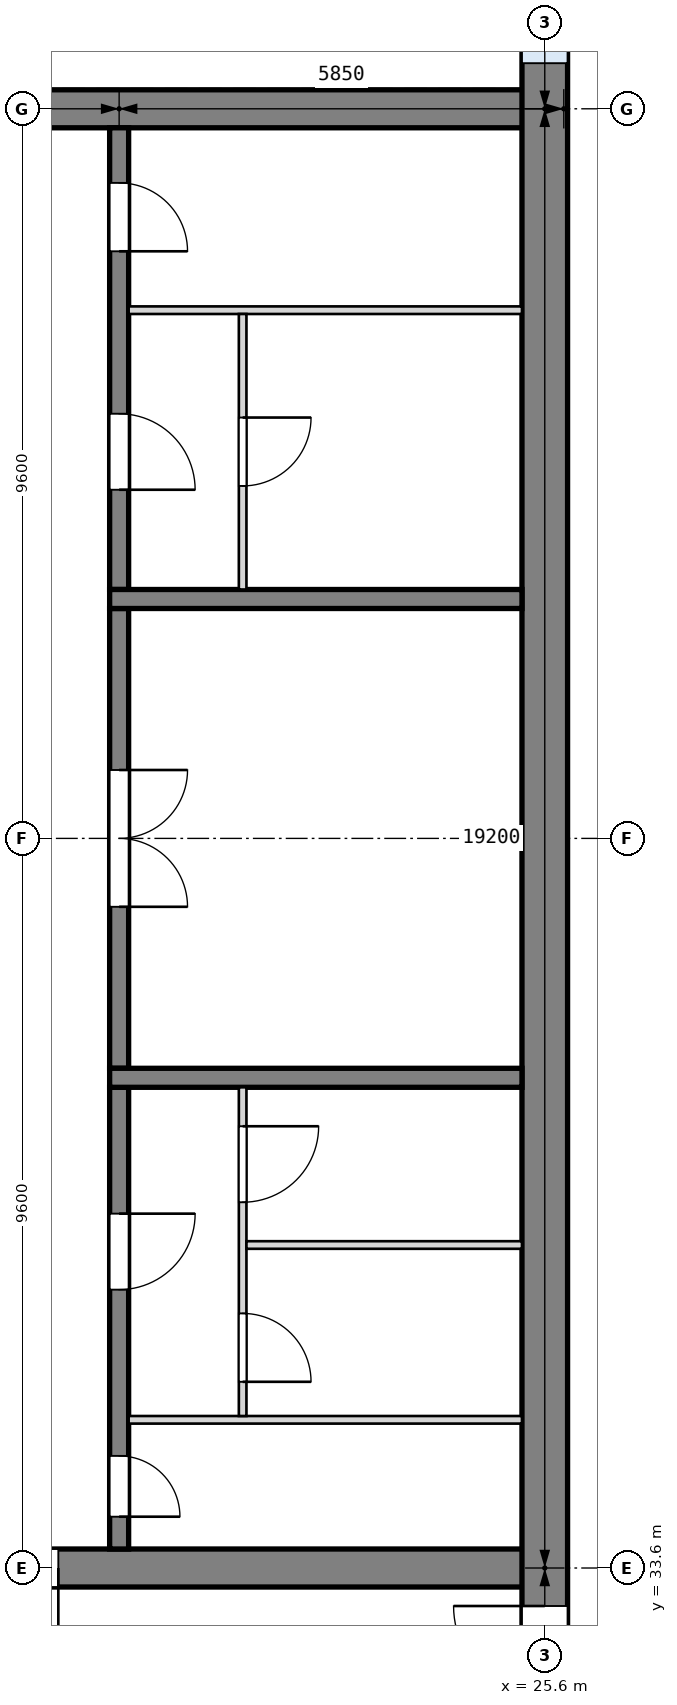
"""IFC4 building model, lengths in metres.
Left out: names, types, materials, properties, quantities, classifications, styles, units other than length and angle.
Written with IfcOpenShell. Run it as: python <this file> out.ifc"""

import sys

from ifc_helpers import new_model, si_unit, direction, frame, frame_2d, origin, place, context, subcontext, project, spatial, rectangle, extrude, element, fill, save


model = new_model("IFC4")
c1 = context("Model", 3, precision=1e-05, world=origin(), true_north=direction((0.0, 1.0)))
c2 = subcontext(c1, "Body", "Model", "MODEL_VIEW")
j1 = project(units=[si_unit("LENGTHUNIT", "METRE"), si_unit("PLANEANGLEUNIT", "RADIAN")], contexts=[c1])
p1 = place(None, origin())
s1 = spatial("IfcSite", under=j1, at=p1, CompositionType="ELEMENT")
p2 = place(p1, origin())
s2 = spatial("IfcBuilding", under=s1, at=p2, CompositionType="ELEMENT")
p3 = place(p2, origin())
s3 = spatial("IfcBuildingStorey", under=s2, at=p3, CompositionType="ELEMENT", Elevation=0.0)
p4 = place(p3, frame((12.55, 52.8, 0.0), z_axis=(0.0, 0.0, 1.0), x_axis=(1.0, 0.0, 0.0)))
e1 = element("IfcWall", 1, at=p4, inside=s3, PredefinedType="SHEAR", context=c2, shape_type="SweptSolid", body=[
    extrude(rectangle(XDim=13.3, YDim=0.5, at=frame_2d((6.65, 0.0))), origin(), (0.0, 0.0, 1.0), 4.2),
])
p5 = place(p4, frame((0.55, 0.0, 0.0)))
e2 = element("IfcOpeningElement", 2, at=p5, cuts=e1, PredefinedType="OPENING", context=c2, shape_type="SweptSolid", body=[
    extrude(rectangle(XDim=1.8, YDim=2.1, at=frame_2d((0.9, 1.05))), frame((0.0, 0.26, 0.0), z_axis=(0.0, -1.0, 0.0), x_axis=(1.0, 0.0, 0.0)), (0.0, 0.0, 1.0), 0.52),
])
p6 = place(p3, frame((12.55, 33.6, 0.0), z_axis=(0.0, 0.0, 1.0), x_axis=(1.0, 0.0, 0.0)))
e3 = element("IfcWall", 3, at=p6, inside=s3, PredefinedType="SHEAR", context=c2, shape_type="SweptSolid", body=[
    extrude(rectangle(XDim=13.3, YDim=0.5, at=frame_2d((6.65, 0.0))), origin(), (0.0, 0.0, 1.0), 4.2),
])
p7 = place(p6, frame((4.65, 0.0, 0.0)))
e4 = element("IfcOpeningElement", 4, at=p7, cuts=e3, PredefinedType="OPENING", context=c2, shape_type="SweptSolid", body=[
    extrude(rectangle(XDim=2.0, YDim=2.1, at=frame_2d((1.0, 1.05))), frame((0.0, 0.26, 0.0), z_axis=(0.0, -1.0, 0.0), x_axis=(1.0, 0.0, 0.0)), (0.0, 0.0, 1.0), 0.52),
])
p8 = place(p6, frame((0.55, 0.0, 0.0)))
e5 = element("IfcOpeningElement", 5, at=p8, cuts=e3, PredefinedType="OPENING", context=c2, shape_type="SweptSolid", body=[
    extrude(rectangle(XDim=1.8, YDim=2.1, at=frame_2d((0.9, 1.05))), frame((0.0, 0.26, 0.0), z_axis=(0.0, -1.0, 0.0), x_axis=(1.0, 0.0, 0.0)), (0.0, 0.0, 1.0), 0.52),
])
p9 = place(p3, frame((25.6, 28.8, 0.0), z_axis=(0.0, 0.0, 1.0), x_axis=(0.0, 1.0, 0.0)))
e6 = element("IfcWall", 6, at=p9, inside=s3, PredefinedType="SHEAR", context=c2, shape_type="SweptSolid", body=[
    extrude(rectangle(XDim=28.8, YDim=0.6, at=frame_2d((14.4, 0.0))), origin(), (0.0, 0.0, 1.0), 4.2),
])
p10 = place(p9, frame((0.5, 0.0, 0.0)))
e7 = element("IfcOpeningElement", 7, at=p10, cuts=e6, PredefinedType="OPENING", context=c2, shape_type="SweptSolid", body=[
    extrude(rectangle(XDim=1.2, YDim=2.1, at=frame_2d((0.6, 1.05))), frame((0.0, 0.31, 0.0), z_axis=(0.0, -1.0, 0.0), x_axis=(1.0, 0.0, 0.0)), (0.0, 0.0, 1.0), 0.62),
])
p11 = place(p9, frame((3.1, 0.0, 0.0)))
e8 = element("IfcOpeningElement", 8, at=p11, cuts=e6, PredefinedType="OPENING", context=c2, shape_type="SweptSolid", body=[
    extrude(rectangle(XDim=1.2, YDim=2.1, at=frame_2d((0.6, 1.05))), frame((0.0, 0.31, 0.0), z_axis=(0.0, -1.0, 0.0), x_axis=(1.0, 0.0, 0.0)), (0.0, 0.0, 1.0), 0.62),
])
p12 = place(p9, frame((27.0, 0.0, 0.0)))
e9 = element("IfcOpeningElement", 9, at=p12, cuts=e6, PredefinedType="OPENING", context=c2, shape_type="SweptSolid", body=[
    extrude(rectangle(XDim=1.2, YDim=2.1, at=frame_2d((0.6, 1.05))), frame((0.0, 0.31, 0.0), z_axis=(0.0, -1.0, 0.0), x_axis=(1.0, 0.0, 0.0)), (0.0, 0.0, 1.0), 0.62),
])
p13 = place(p9, frame((24.6, 0.0, 1.0)))
e10 = element("IfcOpeningElement", 10, at=p13, cuts=e6, PredefinedType="OPENING", context=c2, shape_type="SweptSolid", body=[
    extrude(rectangle(XDim=2.0, YDim=1.2, at=frame_2d((1.0, 0.6))), frame((0.0, 0.31, 0.0), z_axis=(0.0, -1.0, 0.0), x_axis=(1.0, 0.0, 0.0)), (0.0, 0.0, 1.0), 0.62),
])
p14 = place(p3, frame((20.0, 33.85, 0.0), z_axis=(0.0, 0.0, 1.0), x_axis=(0.0, 1.0, 0.0)))
e11 = element("IfcWall", 11, at=p14, inside=s3, PredefinedType="SOLIDWALL", context=c2, shape_type="SweptSolid", body=[
    extrude(rectangle(XDim=6.075, YDim=0.25, at=frame_2d((3.038, 0.0))), origin(), (0.0, 0.0, 1.0), 3.9),
])
p15 = place(p14, frame((0.425, 0.0, 0.0)))
e12 = element("IfcOpeningElement", 12, at=p15, cuts=e11, PredefinedType="OPENING", context=c2, shape_type="SweptSolid", body=[
    extrude(rectangle(XDim=0.8, YDim=2.1, at=frame_2d((0.4, 1.05))), frame((0.0, 0.135, 0.0), z_axis=(0.0, -1.0, 0.0), x_axis=(1.0, 0.0, 0.0)), (0.0, 0.0, 1.0), 0.27),
])
p16 = place(p14, frame((3.413, 0.0, 0.0)))
e13 = element("IfcOpeningElement", 13, at=p16, cuts=e11, PredefinedType="OPENING", context=c2, shape_type="SweptSolid", body=[
    extrude(rectangle(XDim=1.0, YDim=2.1, at=frame_2d((0.5, 1.05))), frame((0.0, 0.135, 0.0), z_axis=(0.0, -1.0, 0.0), x_axis=(1.0, 0.0, 0.0)), (0.0, 0.0, 1.0), 0.27),
])
p17 = place(p3, frame((20.0, 40.175, 0.0), z_axis=(0.0, 0.0, 1.0), x_axis=(0.0, 1.0, 0.0)))
e14 = element("IfcWall", 14, at=p17, inside=s3, PredefinedType="SOLIDWALL", context=c2, shape_type="SweptSolid", body=[
    extrude(rectangle(XDim=6.05, YDim=0.25, at=frame_2d((3.025, 0.0))), origin(), (0.0, 0.0, 1.0), 3.9),
])
p18 = place(p17, frame((2.125, 0.0, 0.0)))
e15 = element("IfcOpeningElement", 15, at=p18, cuts=e14, PredefinedType="OPENING", context=c2, shape_type="SweptSolid", body=[
    extrude(rectangle(XDim=1.8, YDim=2.1, at=frame_2d((0.9, 1.05))), frame((0.0, 0.135, 0.0), z_axis=(0.0, -1.0, 0.0), x_axis=(1.0, 0.0, 0.0)), (0.0, 0.0, 1.0), 0.27),
])
p19 = place(p3, frame((20.0, 46.475, 0.0), z_axis=(0.0, 0.0, 1.0), x_axis=(0.0, 1.0, 0.0)))
e16 = element("IfcWall", 16, at=p19, inside=s3, PredefinedType="SOLIDWALL", context=c2, shape_type="SweptSolid", body=[
    extrude(rectangle(XDim=6.075, YDim=0.25, at=frame_2d((3.038, 0.0))), origin(), (0.0, 0.0, 1.0), 3.9),
])
p20 = place(p19, frame((1.312, 0.0, 0.0)))
e17 = element("IfcOpeningElement", 17, at=p20, cuts=e16, PredefinedType="OPENING", context=c2, shape_type="SweptSolid", body=[
    extrude(rectangle(XDim=1.0, YDim=2.1, at=frame_2d((0.5, 1.05))), frame((0.0, 0.135, 0.0), z_axis=(0.0, -1.0, 0.0), x_axis=(1.0, 0.0, 0.0)), (0.0, 0.0, 1.0), 0.27),
])
p21 = place(p19, frame((4.45, 0.0, 0.0)))
e18 = element("IfcOpeningElement", 18, at=p21, cuts=e16, PredefinedType="OPENING", context=c2, shape_type="SweptSolid", body=[
    extrude(rectangle(XDim=0.9, YDim=2.1, at=frame_2d((0.45, 1.05))), frame((0.0, 0.135, 0.0), z_axis=(0.0, -1.0, 0.0), x_axis=(1.0, 0.0, 0.0)), (0.0, 0.0, 1.0), 0.27),
])
for number, where, z_axis, x_axis in (
    (19, (19.875, 40.05, 0.0), (0.0, 0.0, 1.0), (1.0, 0.0, 0.0)),
    (20, (19.875, 46.35, 0.0), (0.0, 0.0, 1.0), (1.0, 0.0, 0.0)),
):
    element("IfcWall", number, at=place(p3, frame(where, z_axis=z_axis, x_axis=x_axis)), inside=s3, PredefinedType="SOLIDWALL", context=c2, shape_type="SweptSolid", body=[
        extrude(rectangle(XDim=5.425, YDim=0.25, at=frame_2d((2.712, 0.0))), origin(), (0.0, 0.0, 1.0), 3.9),
    ])
p22 = place(p3, frame((20.125, 35.55, 0.0), z_axis=(0.0, 0.0, 1.0), x_axis=(1.0, 0.0, 0.0)))
e21 = element("IfcWall", 21, at=p22, inside=s3, PredefinedType="PARTITIONING", context=c2, shape_type="SweptSolid", body=[
    extrude(rectangle(XDim=5.175, YDim=0.1, at=frame_2d((2.587, 0.0))), origin(), (0.0, 0.0, 1.0), 3.9),
])
p23 = place(p3, frame((21.625, 35.6, 0.0), z_axis=(0.0, 0.0, 1.0), x_axis=(0.0, 1.0, 0.0)))
e22 = element("IfcWall", 22, at=p23, inside=s3, PredefinedType="PARTITIONING", context=c2, shape_type="SweptSolid", body=[
    extrude(rectangle(XDim=4.325, YDim=0.1, at=frame_2d((2.163, 0.0))), origin(), (0.0, 0.0, 1.0), 3.9),
])
p24 = place(p23, frame((0.45, 0.0, 0.0)))
e23 = element("IfcOpeningElement", 23, at=p24, cuts=e22, PredefinedType="OPENING", context=c2, shape_type="SweptSolid", body=[
    extrude(rectangle(XDim=0.9, YDim=2.1, at=frame_2d((0.45, 1.05))), frame((0.0, 0.06, 0.0), z_axis=(0.0, -1.0, 0.0), x_axis=(1.0, 0.0, 0.0)), (0.0, 0.0, 1.0), 0.12),
])
p25 = place(p23, frame((2.812, 0.0, 0.0)))
e24 = element("IfcOpeningElement", 24, at=p25, cuts=e22, PredefinedType="OPENING", context=c2, shape_type="SweptSolid", body=[
    extrude(rectangle(XDim=1.0, YDim=2.1, at=frame_2d((0.5, 1.05))), frame((0.0, 0.06, 0.0), z_axis=(0.0, -1.0, 0.0), x_axis=(1.0, 0.0, 0.0)), (0.0, 0.0, 1.0), 0.12),
])
p26 = place(p3, frame((21.675, 37.85, 0.0), z_axis=(0.0, 0.0, 1.0), x_axis=(1.0, 0.0, 0.0)))
e25 = element("IfcWall", 25, at=p26, inside=s3, PredefinedType="PARTITIONING", context=c2, shape_type="SweptSolid", body=[
    extrude(rectangle(XDim=3.625, YDim=0.1, at=frame_2d((1.812, 0.0))), origin(), (0.0, 0.0, 1.0), 3.9),
])
p27 = place(p3, frame((20.125, 50.15, 0.0), z_axis=(0.0, 0.0, 1.0), x_axis=(1.0, 0.0, 0.0)))
e26 = element("IfcWall", 26, at=p27, inside=s3, PredefinedType="PARTITIONING", context=c2, shape_type="SweptSolid", body=[
    extrude(rectangle(XDim=5.175, YDim=0.1, at=frame_2d((2.587, 0.0))), origin(), (0.0, 0.0, 1.0), 3.9),
])
p28 = place(p3, frame((21.625, 46.475, 0.0), z_axis=(0.0, 0.0, 1.0), x_axis=(0.0, 1.0, 0.0)))
e27 = element("IfcWall", 27, at=p28, inside=s3, PredefinedType="PARTITIONING", context=c2, shape_type="SweptSolid", body=[
    extrude(rectangle(XDim=3.625, YDim=0.1, at=frame_2d((1.812, 0.0))), origin(), (0.0, 0.0, 1.0), 3.9),
])
p29 = place(p28, frame((1.363, 0.0, 0.0)))
e28 = element("IfcOpeningElement", 28, at=p29, cuts=e27, PredefinedType="OPENING", context=c2, shape_type="SweptSolid", body=[
    extrude(rectangle(XDim=0.9, YDim=2.1, at=frame_2d((0.45, 1.05))), frame((0.0, 0.06, 0.0), z_axis=(0.0, -1.0, 0.0), x_axis=(1.0, 0.0, 0.0)), (0.0, 0.0, 1.0), 0.12),
])
p30 = place(p18, frame((1.8, 0.0, 0.0), z_axis=(0.0, 0.0, 1.0), x_axis=(-1.0, 0.0, 0.0)))
e29 = element("IfcDoor", 29, at=p30, inside=s3, OperationType="DOUBLE_DOOR_SINGLE_SWING", PredefinedType="DOOR", context=c2, shape_type="SweptSolid", body=[
    extrude(rectangle(XDim=1.8, YDim=2.1, at=frame_2d((0.9, 1.05))), frame((0.0, 0.025, 0.0), z_axis=(0.0, -1.0, 0.0), x_axis=(1.0, 0.0, 0.0)), (0.0, 0.0, 1.0), 0.05),
])
fill(e15, e29)
p31 = place(p15, frame((0.8, 0.0, 0.0), z_axis=(0.0, 0.0, 1.0), x_axis=(-1.0, 0.0, 0.0)))
e30 = element("IfcDoor", 30, at=p31, inside=s3, OperationType="SINGLE_SWING_RIGHT", PredefinedType="DOOR", context=c2, shape_type="SweptSolid", body=[
    extrude(rectangle(XDim=0.8, YDim=2.1, at=frame_2d((0.4, 1.05))), frame((0.0, 0.025, 0.0), z_axis=(0.0, -1.0, 0.0), x_axis=(1.0, 0.0, 0.0)), (0.0, 0.0, 1.0), 0.05),
])
fill(e12, e30)
p32 = place(p16, frame((1.0, 0.0, 0.0), z_axis=(0.0, 0.0, 1.0), x_axis=(-1.0, 0.0, 0.0)))
e31 = element("IfcDoor", 31, at=p32, inside=s3, OperationType="SINGLE_SWING_LEFT", PredefinedType="DOOR", context=c2, shape_type="SweptSolid", body=[
    extrude(rectangle(XDim=1.0, YDim=2.1, at=frame_2d((0.5, 1.05))), frame((0.0, 0.025, 0.0), z_axis=(0.0, -1.0, 0.0), x_axis=(1.0, 0.0, 0.0)), (0.0, 0.0, 1.0), 0.05),
])
fill(e13, e31)
p33 = place(p24, frame((0.9, 0.0, 0.0), z_axis=(0.0, 0.0, 1.0), x_axis=(-1.0, 0.0, 0.0)))
e32 = element("IfcDoor", 32, at=p33, inside=s3, OperationType="SINGLE_SWING_RIGHT", PredefinedType="DOOR", context=c2, shape_type="SweptSolid", body=[
    extrude(rectangle(XDim=0.9, YDim=2.1, at=frame_2d((0.45, 1.05))), frame((0.0, 0.025, 0.0), z_axis=(0.0, -1.0, 0.0), x_axis=(1.0, 0.0, 0.0)), (0.0, 0.0, 1.0), 0.05),
])
fill(e23, e32)
p34 = place(p25, frame((1.0, 0.0, 0.0), z_axis=(0.0, 0.0, 1.0), x_axis=(-1.0, 0.0, 0.0)))
e33 = element("IfcDoor", 33, at=p34, inside=s3, OperationType="SINGLE_SWING_LEFT", PredefinedType="DOOR", context=c2, shape_type="SweptSolid", body=[
    extrude(rectangle(XDim=1.0, YDim=2.1, at=frame_2d((0.5, 1.05))), frame((0.0, 0.025, 0.0), z_axis=(0.0, -1.0, 0.0), x_axis=(1.0, 0.0, 0.0)), (0.0, 0.0, 1.0), 0.05),
])
fill(e24, e33)
p35 = place(p20, frame((1.0, 0.0, 0.0), z_axis=(0.0, 0.0, 1.0), x_axis=(-1.0, 0.0, 0.0)))
e34 = element("IfcDoor", 34, at=p35, inside=s3, OperationType="SINGLE_SWING_RIGHT", PredefinedType="DOOR", context=c2, shape_type="SweptSolid", body=[
    extrude(rectangle(XDim=1.0, YDim=2.1, at=frame_2d((0.5, 1.05))), frame((0.0, 0.025, 0.0), z_axis=(0.0, -1.0, 0.0), x_axis=(1.0, 0.0, 0.0)), (0.0, 0.0, 1.0), 0.05),
])
fill(e17, e34)
p36 = place(p29, frame((0.9, 0.0, 0.0), z_axis=(0.0, 0.0, 1.0), x_axis=(-1.0, 0.0, 0.0)))
e35 = element("IfcDoor", 35, at=p36, inside=s3, OperationType="SINGLE_SWING_LEFT", PredefinedType="DOOR", context=c2, shape_type="SweptSolid", body=[
    extrude(rectangle(XDim=0.9, YDim=2.1, at=frame_2d((0.45, 1.05))), frame((0.0, 0.025, 0.0), z_axis=(0.0, -1.0, 0.0), x_axis=(1.0, 0.0, 0.0)), (0.0, 0.0, 1.0), 0.05),
])
fill(e28, e35)
p37 = place(p21, frame((0.9, 0.0, 0.0), z_axis=(0.0, 0.0, 1.0), x_axis=(-1.0, 0.0, 0.0)))
e36 = element("IfcDoor", 36, at=p37, inside=s3, OperationType="SINGLE_SWING_RIGHT", PredefinedType="DOOR", context=c2, shape_type="SweptSolid", body=[
    extrude(rectangle(XDim=0.9, YDim=2.1, at=frame_2d((0.45, 1.05))), frame((0.0, 0.025, 0.0), z_axis=(0.0, -1.0, 0.0), x_axis=(1.0, 0.0, 0.0)), (0.0, 0.0, 1.0), 0.05),
])
fill(e18, e36)
p38 = place(p7, frame((2.0, 0.0, 0.0), z_axis=(0.0, 0.0, 1.0), x_axis=(-1.0, 0.0, 0.0)))
e37 = element("IfcDoor", 37, at=p38, inside=s3, OperationType="DOUBLE_DOOR_SINGLE_SWING", PredefinedType="DOOR", context=c2, shape_type="SweptSolid", body=[
    extrude(rectangle(XDim=2.0, YDim=2.1, at=frame_2d((1.0, 1.05))), frame((0.0, 0.025, 0.0), z_axis=(0.0, -1.0, 0.0), x_axis=(1.0, 0.0, 0.0)), (0.0, 0.0, 1.0), 0.05),
])
fill(e4, e37)
p39 = place(p11, origin())
e38 = element("IfcDoor", 38, at=p39, inside=s3, OperationType="SINGLE_SWING_RIGHT", PredefinedType="DOOR", context=c2, shape_type="SweptSolid", body=[
    extrude(rectangle(XDim=1.2, YDim=2.1, at=frame_2d((0.6, 1.05))), frame((0.0, 0.025, 0.0), z_axis=(0.0, -1.0, 0.0), x_axis=(1.0, 0.0, 0.0)), (0.0, 0.0, 1.0), 0.05),
])
fill(e8, e38)
p40 = place(p13, origin())
e39 = element("IfcWindow", 39, at=p40, inside=s3, PartitioningType="SINGLE_PANEL", PredefinedType="WINDOW", context=c2, shape_type="SweptSolid", body=[
    extrude(rectangle(XDim=2.0, YDim=1.2, at=frame_2d((1.0, 0.6))), frame((0.0, 0.03, 0.0), z_axis=(0.0, -1.0, 0.0), x_axis=(1.0, 0.0, 0.0)), (0.0, 0.0, 1.0), 0.06),
])
fill(e10, e39)
save(model, sys.argv[1])
